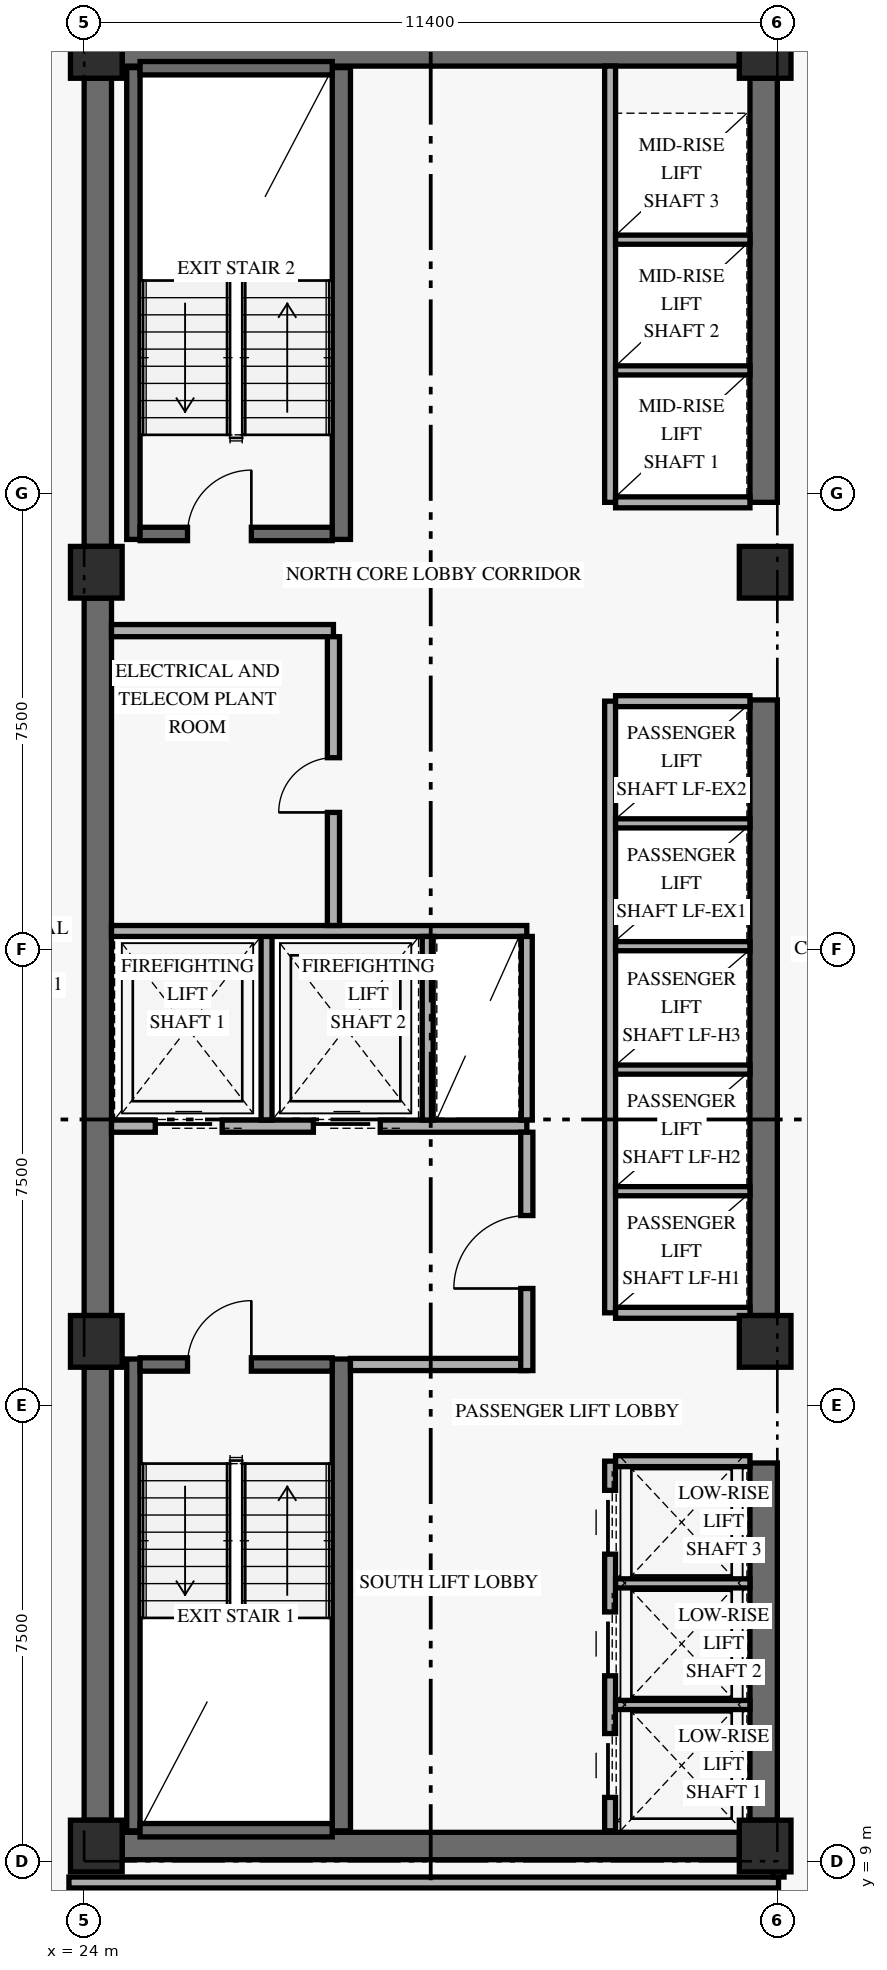
"""IFC4 building model, lengths in metres.
Left out: names, types, materials, properties, quantities, classifications, styles, units other than length and angle.
Written with IfcOpenShell. Run it as: python <this file> out.ifc"""

import sys

from ifc_helpers import new_model, si_unit, direction, frame, frame_2d, origin, origin_2d, place, context, subcontext, project, spatial, rectangle, extrude, element, fill, save


model = new_model("IFC4")
c1 = context("Model", 3, precision=1e-05, world=origin(), true_north=direction((0.0, 1.0)))
c2 = subcontext(c1, "Body", "Model", "MODEL_VIEW")
j1 = project(units=[si_unit("LENGTHUNIT", "METRE"), si_unit("PLANEANGLEUNIT", "RADIAN")], contexts=[c1])
p1 = place(None, origin())
s1 = spatial("IfcSite", under=j1, at=p1, CompositionType="ELEMENT")
p2 = place(p1, origin())
s2 = spatial("IfcBuilding", under=s1, at=p2, CompositionType="ELEMENT")
p3 = place(p2, frame((0.0, 0.0, 45.6)))
s3 = spatial("IfcBuildingStorey", under=s2, at=p3, CompositionType="ELEMENT", Elevation=45.6)
p4 = place(p3, frame((24.225, 9.675, 0.0), z_axis=(0.0, 0.0, 1.0), x_axis=(0.0, 1.0, 0.0)))
e1 = element("IfcWall", 1, at=p4, inside=s3, PredefinedType="SHEAR", context=c2, shape_type="SweptSolid", body=[
    extrude(rectangle(XDim=7.45, YDim=0.45, at=frame_2d((3.725, 0.0))), origin(), (0.0, 0.0, 1.0), 2.667),
])
p5 = place(p3, frame((24.225, 17.975, 0.0), z_axis=(0.0, 0.0, 1.0), x_axis=(0.0, 1.0, 0.0)))
e2 = element("IfcWall", 2, at=p5, inside=s3, PredefinedType="SHEAR", context=c2, shape_type="SweptSolid", body=[
    extrude(rectangle(XDim=11.8, YDim=0.45, at=frame_2d((5.9, 0.0))), origin(), (0.0, 0.0, 1.0), 2.667),
])
p6 = place(p3, frame((24.225, 30.625, 0.0), z_axis=(0.0, 0.0, 1.0), x_axis=(0.0, 1.0, 0.0)))
e3 = element("IfcWall", 3, at=p6, inside=s3, PredefinedType="SHEAR", context=c2, shape_type="SweptSolid", body=[
    extrude(rectangle(XDim=7.7, YDim=0.45, at=frame_2d((3.85, 0.0))), origin(), (0.0, 0.0, 1.0), 2.667),
])
p7 = place(p3, frame((35.175, 9.675, 0.0), z_axis=(0.0, 0.0, 1.0), x_axis=(0.0, 1.0, 0.0)))
e4 = element("IfcWall", 4, at=p7, inside=s3, PredefinedType="SHEAR", context=c2, shape_type="SweptSolid", body=[
    extrude(rectangle(XDim=5.875, YDim=0.45, at=frame_2d((2.938, 0.0))), origin(), (0.0, 0.0, 1.0), 2.667),
])
p8 = place(p3, frame((35.175, 17.975, 0.0), z_axis=(0.0, 0.0, 1.0), x_axis=(0.0, 1.0, 0.0)))
e5 = element("IfcWall", 5, at=p8, inside=s3, PredefinedType="SHEAR", context=c2, shape_type="SweptSolid", body=[
    extrude(rectangle(XDim=10.125, YDim=0.45, at=frame_2d((5.062, 0.0))), origin(), (0.0, 0.0, 1.0), 2.667),
])
p9 = place(p3, frame((35.175, 31.35, 0.0), z_axis=(0.0, 0.0, 1.0), x_axis=(0.0, 1.0, 0.0)))
e6 = element("IfcWall", 6, at=p9, inside=s3, PredefinedType="SHEAR", context=c2, shape_type="SweptSolid", body=[
    extrude(rectangle(XDim=6.975, YDim=0.45, at=frame_2d((3.487, 0.0))), origin(), (0.0, 0.0, 1.0), 2.667),
])
for number, where, z_axis, x_axis in (
    (7, (24.625, 9.25, 0.0), (0.0, 0.0, 1.0), (1.0, 0.0, 0.0)),
    (8, (24.625, 38.75, 0.0), (0.0, 0.0, 1.0), (1.0, 0.0, 0.0)),
):
    element("IfcWall", number, at=place(p3, frame(where, z_axis=z_axis, x_axis=x_axis)), inside=s3, PredefinedType="SHEAR", context=c2, shape_type="SweptSolid", body=[
        extrude(rectangle(XDim=10.15, YDim=0.45, at=frame_2d((5.075, 0.0))), origin(), (0.0, 0.0, 1.0), 3.36),
    ])
p10 = place(p3, frame((24.81, 9.5, 0.0), z_axis=(0.0, 0.0, 1.0), x_axis=(0.0, 1.0, 0.0)))
e9 = element("IfcWall", 9, at=p10, inside=s3, PredefinedType="SHEAR", context=c2, shape_type="SweptSolid", body=[
    extrude(rectangle(XDim=7.76, YDim=0.22, at=frame_2d((3.88, 0.0))), origin(), (0.0, 0.0, 1.0), 3.36),
])
p11 = place(p3, frame((28.23, 9.5, 0.0), z_axis=(0.0, 0.0, 1.0), x_axis=(0.0, 1.0, 0.0)))
e10 = element("IfcWall", 10, at=p11, inside=s3, PredefinedType="SHEAR", context=c2, shape_type="SweptSolid", body=[
    extrude(rectangle(XDim=7.76, YDim=0.3, at=frame_2d((3.88, 0.0))), origin(), (0.0, 0.0, 1.0), 3.36),
])
p12 = place(p3, frame((24.92, 9.51, 0.0), z_axis=(0.0, 0.0, 1.0), x_axis=(1.0, 0.0, 0.0)))
e11 = element("IfcWall", 11, at=p12, inside=s3, PredefinedType="SHEAR", context=c2, shape_type="SweptSolid", body=[
    extrude(rectangle(XDim=3.16, YDim=0.22, at=frame_2d((1.58, 0.0))), origin(), (0.0, 0.0, 1.0), 3.36),
])
p13 = place(p3, frame((24.92, 17.17, 0.0), z_axis=(0.0, 0.0, 1.0), x_axis=(1.0, 0.0, 0.0)))
e12 = element("IfcWall", 12, at=p13, inside=s3, PredefinedType="SHEAR", context=c2, shape_type="SweptSolid", body=[
    extrude(rectangle(XDim=3.16, YDim=0.22, at=frame_2d((1.58, 0.0))), origin(), (0.0, 0.0, 1.0), 3.36),
])
p14 = place(p13, frame((0.78, 0.0, 0.0)))
e13 = element("IfcOpeningElement", 13, at=p14, cuts=e12, PredefinedType="OPENING", context=c2, shape_type="SweptSolid", body=[
    extrude(rectangle(XDim=1.05, YDim=2.15, at=frame_2d((0.525, 1.075))), frame((0.0, 0.12, 0.0), z_axis=(0.0, -1.0, 0.0), x_axis=(1.0, 0.0, 0.0)), (0.0, 0.0, 1.0), 0.24),
])
p15 = place(p3, frame((24.81, 30.74, 0.0), z_axis=(0.0, 0.0, 1.0), x_axis=(0.0, 1.0, 0.0)))
e14 = element("IfcWall", 14, at=p15, inside=s3, PredefinedType="SHEAR", context=c2, shape_type="SweptSolid", body=[
    extrude(rectangle(XDim=7.76, YDim=0.22, at=frame_2d((3.88, 0.0))), origin(), (0.0, 0.0, 1.0), 3.36),
])
p16 = place(p3, frame((28.23, 30.74, 0.0), z_axis=(0.0, 0.0, 1.0), x_axis=(0.0, 1.0, 0.0)))
e15 = element("IfcWall", 15, at=p16, inside=s3, PredefinedType="SHEAR", context=c2, shape_type="SweptSolid", body=[
    extrude(rectangle(XDim=7.76, YDim=0.3, at=frame_2d((3.88, 0.0))), origin(), (0.0, 0.0, 1.0), 3.36),
])
p17 = place(p3, frame((24.92, 30.83, 0.0), z_axis=(0.0, 0.0, 1.0), x_axis=(1.0, 0.0, 0.0)))
e16 = element("IfcWall", 16, at=p17, inside=s3, PredefinedType="SHEAR", context=c2, shape_type="SweptSolid", body=[
    extrude(rectangle(XDim=3.16, YDim=0.22, at=frame_2d((1.58, 0.0))), origin(), (0.0, 0.0, 1.0), 3.36),
])
p18 = place(p17, frame((0.78, 0.0, 0.0)))
e17 = element("IfcOpeningElement", 17, at=p18, cuts=e16, PredefinedType="OPENING", context=c2, shape_type="SweptSolid", body=[
    extrude(rectangle(XDim=1.05, YDim=2.15, at=frame_2d((0.525, 1.075))), frame((0.0, 0.12, 0.0), z_axis=(0.0, -1.0, 0.0), x_axis=(1.0, 0.0, 0.0)), (0.0, 0.0, 1.0), 0.24),
])
p19 = place(p3, frame((24.92, 38.49, 0.0), z_axis=(0.0, 0.0, 1.0), x_axis=(1.0, 0.0, 0.0)))
e18 = element("IfcWall", 18, at=p19, inside=s3, PredefinedType="SHEAR", context=c2, shape_type="SweptSolid", body=[
    extrude(rectangle(XDim=3.16, YDim=0.22, at=frame_2d((1.58, 0.0))), origin(), (0.0, 0.0, 1.0), 3.36),
])
for number, where, z_axis, x_axis in (
    (19, (24.2, 9.25, 0.0), (0.0, 0.0, 1.0), (1.0, 0.0, 0.0)),
    (20, (24.2, 17.55, 0.0), (0.0, 0.0, 1.0), (1.0, 0.0, 0.0)),
    (21, (24.2, 30.2, 0.0), (0.0, 0.0, 1.0), (1.0, 0.0, 0.0)),
    (22, (24.2, 38.75, 0.0), (0.0, 0.0, 1.0), (1.0, 0.0, 0.0)),
    (23, (35.2, 9.25, 0.0), (0.0, 0.0, 1.0), (1.0, 0.0, 0.0)),
    (24, (35.2, 17.55, 0.0), (0.0, 0.0, 1.0), (1.0, 0.0, 0.0)),
    (25, (35.2, 30.2, 0.0), (0.0, 0.0, 1.0), (1.0, 0.0, 0.0)),
    (26, (35.2, 38.75, 0.0), (0.0, 0.0, 1.0), (1.0, 0.0, 0.0)),
):
    element("IfcColumn", number, at=place(p3, frame(where, z_axis=z_axis, x_axis=x_axis)), inside=s3, PredefinedType="COLUMN", context=c2, shape_type="SweptSolid", body=[
        extrude(rectangle(XDim=0.85, YDim=0.85, at=origin_2d()), origin(), (0.0, 0.0, 1.0), 3.6),
    ])
p20 = place(p3, frame((24.45, 21.09, 0.0), z_axis=(0.0, 0.0, 1.0), x_axis=(1.0, 0.0, 0.0)))
e27 = element("IfcWall", 27, at=p20, inside=s3, PredefinedType="STANDARD", context=c2, shape_type="SweptSolid", body=[
    extrude(rectangle(XDim=6.83, YDim=0.2, at=frame_2d((3.415, 0.0))), origin(), (0.0, 0.0, 1.0), 3.36),
])
p21 = place(p20, frame((0.72, 0.0, 0.0)))
e28 = element("IfcOpeningElement", 28, at=p21, cuts=e27, PredefinedType="OPENING", context=c2, shape_type="SweptSolid", body=[
    extrude(rectangle(XDim=1.1, YDim=2.2, at=frame_2d((0.55, 1.1))), frame((0.0, 0.11, 0.0), z_axis=(0.0, -1.0, 0.0), x_axis=(1.0, 0.0, 0.0)), (0.0, 0.0, 1.0), 0.22),
])
p22 = place(p20, frame((3.32, 0.0, 0.0)))
e29 = element("IfcOpeningElement", 29, at=p22, cuts=e27, PredefinedType="OPENING", context=c2, shape_type="SweptSolid", body=[
    extrude(rectangle(XDim=1.1, YDim=2.2, at=frame_2d((0.55, 1.1))), frame((0.0, 0.11, 0.0), z_axis=(0.0, -1.0, 0.0), x_axis=(1.0, 0.0, 0.0)), (0.0, 0.0, 1.0), 0.22),
])
p23 = place(p3, frame((28.38, 17.17, 0.0), z_axis=(0.0, 0.0, 1.0), x_axis=(1.0, 0.0, 0.0)))
e30 = element("IfcWall", 30, at=p23, inside=s3, PredefinedType="STANDARD", context=c2, shape_type="SweptSolid", body=[
    extrude(rectangle(XDim=2.9, YDim=0.2, at=frame_2d((1.45, 0.0))), origin(), (0.0, 0.0, 1.0), 3.36),
])
p24 = place(p3, frame((31.28, 17.07, 0.0), z_axis=(0.0, 0.0, 1.0), x_axis=(0.0, 1.0, 0.0)))
e31 = element("IfcWall", 31, at=p24, inside=s3, PredefinedType="STANDARD", context=c2, shape_type="SweptSolid", body=[
    extrude(rectangle(XDim=3.92, YDim=0.2, at=frame_2d((1.96, 0.0))), origin(), (0.0, 0.0, 1.0), 2.649),
])
p25 = place(p24, frame((1.35, 0.0, 0.0)))
e32 = element("IfcOpeningElement", 32, at=p25, cuts=e31, PredefinedType="OPENING", context=c2, shape_type="SweptSolid", body=[
    extrude(rectangle(XDim=1.2, YDim=2.15, at=frame_2d((0.6, 1.075))), frame((0.0, 0.11, 0.0), z_axis=(0.0, -1.0, 0.0), x_axis=(1.0, 0.0, 0.0)), (0.0, 0.0, 1.0), 0.22),
])
p26 = place(p3, frame((27.0, 21.19, 0.0), z_axis=(0.0, 0.0, 1.0), x_axis=(0.0, 1.0, 0.0)))
e33 = element("IfcWall", 33, at=p26, inside=s3, PredefinedType="STANDARD", context=c2, shape_type="SweptSolid", body=[
    extrude(rectangle(XDim=3.11, YDim=0.18, at=frame_2d((1.555, 0.0))), origin(), (0.0, 0.0, 1.0), 3.36),
])
p27 = place(p3, frame((24.45, 24.3, 0.0), z_axis=(0.0, 0.0, 1.0), x_axis=(1.0, 0.0, 0.0)))
e34 = element("IfcWall", 34, at=p27, inside=s3, PredefinedType="STANDARD", context=c2, shape_type="SweptSolid", body=[
    extrude(rectangle(XDim=6.83, YDim=0.18, at=frame_2d((3.415, 0.0))), origin(), (0.0, 0.0, 1.0), 3.36),
])
for number, where, z_axis, x_axis in (
    (35, (29.65, 21.19, 0.0), (0.0, 0.0, 1.0), (0.0, 1.0, 0.0)),
    (36, (31.28, 21.19, 0.0), (0.0, 0.0, 1.0), (0.0, 1.0, 0.0)),
):
    element("IfcWall", number, at=place(p3, frame(where, z_axis=z_axis, x_axis=x_axis)), inside=s3, PredefinedType="STANDARD", context=c2, shape_type="SweptSolid", body=[
        extrude(rectangle(XDim=3.02, YDim=0.18, at=frame_2d((1.51, 0.0))), origin(), (0.0, 0.0, 1.0), 3.36),
    ])
p28 = place(p3, frame((24.45, 29.24, 0.0), z_axis=(0.0, 0.0, 1.0), x_axis=(1.0, 0.0, 0.0)))
e37 = element("IfcWall", 37, at=p28, inside=s3, PredefinedType="STANDARD", context=c2, shape_type="SweptSolid", body=[
    extrude(rectangle(XDim=3.65, YDim=0.2, at=frame_2d((1.825, 0.0))), origin(), (0.0, 0.0, 1.0), 3.36),
])
p29 = place(p3, frame((28.1, 24.39, 0.0), z_axis=(0.0, 0.0, 1.0), x_axis=(0.0, 1.0, 0.0)))
e38 = element("IfcWall", 38, at=p29, inside=s3, PredefinedType="STANDARD", context=c2, shape_type="SweptSolid", body=[
    extrude(rectangle(XDim=4.75, YDim=0.2, at=frame_2d((2.375, 0.0))), origin(), (0.0, 0.0, 1.0), 3.36),
])
p30 = place(p29, frame((1.86, 0.0, 0.0)))
e39 = element("IfcOpeningElement", 39, at=p30, cuts=e38, PredefinedType="OPENING", context=c2, shape_type="SweptSolid", body=[
    extrude(rectangle(XDim=0.9, YDim=2.1, at=frame_2d((0.45, 1.05))), frame((0.0, 0.11, 0.0), z_axis=(0.0, -1.0, 0.0), x_axis=(1.0, 0.0, 0.0)), (0.0, 0.0, 1.0), 0.22),
])
p31 = place(p3, frame((32.65, 9.5, 0.0), z_axis=(0.0, 0.0, 1.0), x_axis=(0.0, 1.0, 0.0)))
e40 = element("IfcWall", 40, at=p31, inside=s3, PredefinedType="STANDARD", context=c2, shape_type="SweptSolid", body=[
    extrude(rectangle(XDim=6.08, YDim=0.18, at=frame_2d((3.04, 0.0))), origin(), (0.0, 0.0, 1.0), 3.36),
])
p32 = place(p31, frame((0.55, 0.0, 0.0)))
e41 = element("IfcOpeningElement", 41, at=p32, cuts=e40, PredefinedType="OPENING", context=c2, shape_type="SweptSolid", body=[
    extrude(rectangle(XDim=1.05, YDim=2.2, at=frame_2d((0.525, 1.1))), frame((0.0, 0.1, 0.0), z_axis=(0.0, -1.0, 0.0), x_axis=(1.0, 0.0, 0.0)), (0.0, 0.0, 1.0), 0.2),
])
p33 = place(p31, frame((2.55, 0.0, 0.0)))
e42 = element("IfcOpeningElement", 42, at=p33, cuts=e40, PredefinedType="OPENING", context=c2, shape_type="SweptSolid", body=[
    extrude(rectangle(XDim=1.05, YDim=2.2, at=frame_2d((0.525, 1.1))), frame((0.0, 0.1, 0.0), z_axis=(0.0, -1.0, 0.0), x_axis=(1.0, 0.0, 0.0)), (0.0, 0.0, 1.0), 0.2),
])
p34 = place(p31, frame((4.55, 0.0, 0.0)))
e43 = element("IfcOpeningElement", 43, at=p34, cuts=e40, PredefinedType="OPENING", context=c2, shape_type="SweptSolid", body=[
    extrude(rectangle(XDim=1.05, YDim=2.2, at=frame_2d((0.525, 1.1))), frame((0.0, 0.1, 0.0), z_axis=(0.0, -1.0, 0.0), x_axis=(1.0, 0.0, 0.0)), (0.0, 0.0, 1.0), 0.2),
])
p35 = place(p3, frame((32.74, 15.58, 0.0), z_axis=(0.0, 0.0, 1.0), x_axis=(1.0, 0.0, 0.0)))
e44 = element("IfcWall", 44, at=p35, inside=s3, PredefinedType="STANDARD", context=c2, shape_type="SweptSolid", body=[
    extrude(rectangle(XDim=2.21, YDim=0.18, at=frame_2d((1.105, 0.0))), origin(), (0.0, 0.0, 1.0), 3.36),
])
for number, where, z_axis, x_axis in (
    (45, (32.74, 11.57, 0.0), (0.0, 0.0, 1.0), (1.0, 0.0, 0.0)),
    (46, (32.74, 13.57, 0.0), (0.0, 0.0, 1.0), (1.0, 0.0, 0.0)),
):
    element("IfcWall", number, at=place(p3, frame(where, z_axis=z_axis, x_axis=x_axis)), inside=s3, PredefinedType="STANDARD", context=c2, shape_type="SweptSolid", body=[
        extrude(rectangle(XDim=2.21, YDim=0.15, at=frame_2d((1.105, 0.0))), origin(), (0.0, 0.0, 1.0), 3.36),
    ])
p36 = place(p3, frame((32.65, 18.02, 0.0), z_axis=(0.0, 0.0, 1.0), x_axis=(0.0, 1.0, 0.0)))
e47 = element("IfcWall", 47, at=p36, inside=s3, PredefinedType="STANDARD", context=c2, shape_type="SweptSolid", body=[
    extrude(rectangle(XDim=10.06, YDim=0.18, at=frame_2d((5.03, 0.0))), origin(), (0.0, 0.0, 1.0), 3.36),
])
for number, where, z_axis, x_axis in (
    (48, (32.74, 18.02, 0.0), (0.0, 0.0, 1.0), (1.0, 0.0, 0.0)),
    (49, (32.74, 28.08, 0.0), (0.0, 0.0, 1.0), (1.0, 0.0, 0.0)),
):
    element("IfcWall", number, at=place(p3, frame(where, z_axis=z_axis, x_axis=x_axis)), inside=s3, PredefinedType="STANDARD", context=c2, shape_type="SweptSolid", body=[
        extrude(rectangle(XDim=2.21, YDim=0.18, at=frame_2d((1.105, 0.0))), origin(), (0.0, 0.0, 1.0), 3.36),
    ])
for number, where, z_axis, x_axis in (
    (50, (32.74, 20.02, 0.0), (0.0, 0.0, 1.0), (1.0, 0.0, 0.0)),
    (51, (32.74, 22.02, 0.0), (0.0, 0.0, 1.0), (1.0, 0.0, 0.0)),
    (52, (32.74, 24.05, 0.0), (0.0, 0.0, 1.0), (1.0, 0.0, 0.0)),
    (53, (32.74, 26.07, 0.0), (0.0, 0.0, 1.0), (1.0, 0.0, 0.0)),
):
    element("IfcWall", number, at=place(p3, frame(where, z_axis=z_axis, x_axis=x_axis)), inside=s3, PredefinedType="STANDARD", context=c2, shape_type="SweptSolid", body=[
        extrude(rectangle(XDim=2.21, YDim=0.15, at=frame_2d((1.105, 0.0))), origin(), (0.0, 0.0, 1.0), 3.36),
    ])
p37 = place(p3, frame((32.65, 31.35, 0.0), z_axis=(0.0, 0.0, 1.0), x_axis=(0.0, 1.0, 0.0)))
e54 = element("IfcWall", 54, at=p37, inside=s3, PredefinedType="STANDARD", context=c2, shape_type="SweptSolid", body=[
    extrude(rectangle(XDim=7.175, YDim=0.18, at=frame_2d((3.587, 0.0))), origin(), (0.0, 0.0, 1.0), 3.36),
])
p38 = place(p3, frame((32.74, 31.35, 0.0), z_axis=(0.0, 0.0, 1.0), x_axis=(1.0, 0.0, 0.0)))
e55 = element("IfcWall", 55, at=p38, inside=s3, PredefinedType="STANDARD", context=c2, shape_type="SweptSolid", body=[
    extrude(rectangle(XDim=2.21, YDim=0.18, at=frame_2d((1.105, 0.0))), origin(), (0.0, 0.0, 1.0), 3.36),
])
for number, where, z_axis, x_axis in (
    (56, (32.74, 33.52, 0.0), (0.0, 0.0, 1.0), (1.0, 0.0, 0.0)),
    (57, (32.74, 35.67, 0.0), (0.0, 0.0, 1.0), (1.0, 0.0, 0.0)),
):
    element("IfcWall", number, at=place(p3, frame(where, z_axis=z_axis, x_axis=x_axis)), inside=s3, PredefinedType="STANDARD", context=c2, shape_type="SweptSolid", body=[
        extrude(rectangle(XDim=2.21, YDim=0.15, at=frame_2d((1.105, 0.0))), origin(), (0.0, 0.0, 1.0), 3.36),
    ])
p39 = place(p3, frame((23.75, 8.65, 0.0), z_axis=(0.0, 0.0, 1.0), x_axis=(1.0, 0.0, 0.0)))
e58 = element("IfcWall", 58, at=p39, inside=s3, PredefinedType="STANDARD", context=c2, shape_type="SweptSolid", body=[
    extrude(rectangle(XDim=11.67, YDim=0.18, at=frame_2d((5.835, 0.0))), origin(), (0.0, 0.0, 1.0), 2.649),
])
for number, where, z_axis, x_axis in (
    (59, (35.42, 8.74, 0.0), (0.0, 0.0, 1.0), (0.0, 1.0, 0.0)),
    (60, (35.42, 38.75, 0.0), (0.0, 0.0, 1.0), (0.0, 1.0, 0.0)),
):
    element("IfcWall", number, at=place(p3, frame(where, z_axis=z_axis, x_axis=x_axis)), inside=s3, PredefinedType="STANDARD", context=c2, shape_type="SweptSolid", body=[
        extrude(rectangle(XDim=0.51, YDim=0.18, at=frame_2d((0.255, 0.0))), origin(), (0.0, 0.0, 1.0), 3.36),
    ])
p40 = place(p14, frame((1.05, 0.0, 0.0), z_axis=(0.0, 0.0, 1.0), x_axis=(-1.0, 0.0, 0.0)))
e61 = element("IfcDoor", 61, at=p40, inside=s3, OperationType="SINGLE_SWING_LEFT", PredefinedType="DOOR", context=c2, shape_type="SweptSolid", body=[
    extrude(rectangle(XDim=1.05, YDim=2.15, at=frame_2d((0.525, 1.075))), frame((0.0, 0.025, 0.0), z_axis=(0.0, -1.0, 0.0), x_axis=(1.0, 0.0, 0.0)), (0.0, 0.0, 1.0), 0.05),
])
fill(e13, e61)
p41 = place(p18, origin())
e62 = element("IfcDoor", 62, at=p41, inside=s3, OperationType="SINGLE_SWING_RIGHT", PredefinedType="DOOR", context=c2, shape_type="SweptSolid", body=[
    extrude(rectangle(XDim=1.05, YDim=2.15, at=frame_2d((0.525, 1.075))), frame((0.0, 0.025, 0.0), z_axis=(0.0, -1.0, 0.0), x_axis=(1.0, 0.0, 0.0)), (0.0, 0.0, 1.0), 0.05),
])
fill(e17, e62)
p42 = place(p21, origin())
e63 = element("IfcDoor", 63, at=p42, inside=s3, OperationType="SLIDING_TO_LEFT", PredefinedType="DOOR", context=c2, shape_type="SweptSolid", body=[
    extrude(rectangle(XDim=1.1, YDim=2.2, at=frame_2d((0.55, 1.1))), frame((0.0, 0.025, 0.0), z_axis=(0.0, -1.0, 0.0), x_axis=(1.0, 0.0, 0.0)), (0.0, 0.0, 1.0), 0.05),
])
fill(e28, e63)
p43 = place(p22, origin())
e64 = element("IfcDoor", 64, at=p43, inside=s3, OperationType="SLIDING_TO_LEFT", PredefinedType="DOOR", context=c2, shape_type="SweptSolid", body=[
    extrude(rectangle(XDim=1.1, YDim=2.2, at=frame_2d((0.55, 1.1))), frame((0.0, 0.025, 0.0), z_axis=(0.0, -1.0, 0.0), x_axis=(1.0, 0.0, 0.0)), (0.0, 0.0, 1.0), 0.05),
])
fill(e29, e64)
p44 = place(p25, origin())
e65 = element("IfcDoor", 65, at=p44, inside=s3, OperationType="SINGLE_SWING_LEFT", PredefinedType="DOOR", context=c2, shape_type="SweptSolid", body=[
    extrude(rectangle(XDim=1.2, YDim=2.15, at=frame_2d((0.6, 1.075))), frame((0.0, 0.025, 0.0), z_axis=(0.0, -1.0, 0.0), x_axis=(1.0, 0.0, 0.0)), (0.0, 0.0, 1.0), 0.05),
])
fill(e32, e65)
p45 = place(p30, origin())
e66 = element("IfcDoor", 66, at=p45, inside=s3, OperationType="SINGLE_SWING_LEFT", PredefinedType="DOOR", context=c2, shape_type="SweptSolid", body=[
    extrude(rectangle(XDim=0.9, YDim=2.1, at=frame_2d((0.45, 1.05))), frame((0.0, 0.025, 0.0), z_axis=(0.0, -1.0, 0.0), x_axis=(1.0, 0.0, 0.0)), (0.0, 0.0, 1.0), 0.05),
])
fill(e39, e66)
p46 = place(p32, origin())
e67 = element("IfcDoor", 67, at=p46, inside=s3, OperationType="SLIDING_TO_LEFT", PredefinedType="DOOR", context=c2, shape_type="SweptSolid", body=[
    extrude(rectangle(XDim=1.05, YDim=2.2, at=frame_2d((0.525, 1.1))), frame((0.0, 0.025, 0.0), z_axis=(0.0, -1.0, 0.0), x_axis=(1.0, 0.0, 0.0)), (0.0, 0.0, 1.0), 0.05),
])
fill(e41, e67)
p47 = place(p33, origin())
e68 = element("IfcDoor", 68, at=p47, inside=s3, OperationType="SLIDING_TO_LEFT", PredefinedType="DOOR", context=c2, shape_type="SweptSolid", body=[
    extrude(rectangle(XDim=1.05, YDim=2.2, at=frame_2d((0.525, 1.1))), frame((0.0, 0.025, 0.0), z_axis=(0.0, -1.0, 0.0), x_axis=(1.0, 0.0, 0.0)), (0.0, 0.0, 1.0), 0.05),
])
fill(e42, e68)
p48 = place(p34, origin())
e69 = element("IfcDoor", 69, at=p48, inside=s3, OperationType="SLIDING_TO_LEFT", PredefinedType="DOOR", context=c2, shape_type="SweptSolid", body=[
    extrude(rectangle(XDim=1.05, YDim=2.2, at=frame_2d((0.525, 1.1))), frame((0.0, 0.025, 0.0), z_axis=(0.0, -1.0, 0.0), x_axis=(1.0, 0.0, 0.0)), (0.0, 0.0, 1.0), 0.05),
])
fill(e43, e69)
save(model, sys.argv[1])
